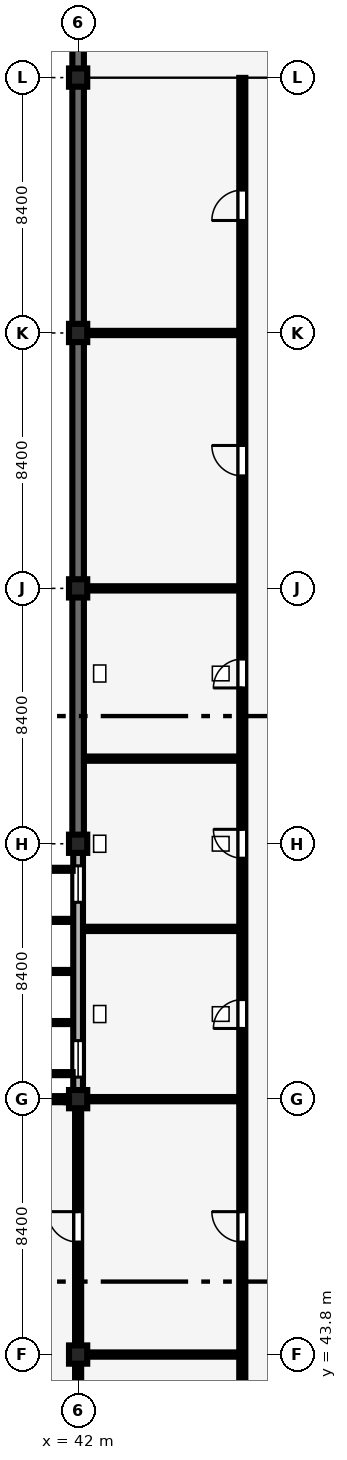
"""IFC4 building model, lengths in metres.
Left out: names, types, materials, properties, quantities, classifications, styles, units other than length and angle.
Written with IfcOpenShell. Run it as: python <this file> out.ifc"""

import sys

from ifc_helpers import new_model, si_unit, direction, frame, frame_2d, origin, origin_2d, place, context, subcontext, project, spatial, rectangle, extrude, element, fill, save


model = new_model("IFC4")
c1 = context("Model", 3, precision=1e-05, world=origin(), true_north=direction((0.0, 1.0)))
c2 = subcontext(c1, "Body", "Model", "MODEL_VIEW")
j1 = project(units=[si_unit("LENGTHUNIT", "METRE"), si_unit("PLANEANGLEUNIT", "RADIAN")], contexts=[c1])
p1 = place(None, origin())
s1 = spatial("IfcSite", under=j1, at=p1, CompositionType="ELEMENT")
p2 = place(p1, origin())
s2 = spatial("IfcBuilding", under=s1, at=p2, CompositionType="ELEMENT")
p3 = place(p2, frame((0.0, 0.0, 4.8)))
s3 = spatial("IfcBuildingStorey", under=s2, at=p3, CompositionType="ELEMENT", Elevation=4.8)
for number, where, z_axis, x_axis in (
    (1, (42.0, 43.8, 0.0), (0.0, 0.0, 1.0), (1.0, 0.0, 0.0)),
    (2, (42.0, 52.2, 0.0), (0.0, 0.0, 1.0), (1.0, 0.0, 0.0)),
    (3, (42.0, 60.6, 0.0), (0.0, 0.0, 1.0), (1.0, 0.0, 0.0)),
    (4, (42.0, 69.0, 0.0), (0.0, 0.0, 1.0), (1.0, 0.0, 0.0)),
    (5, (42.0, 77.4, 0.0), (0.0, 0.0, 1.0), (1.0, 0.0, 0.0)),
    (6, (42.0, 85.8, 0.0), (0.0, 0.0, 1.0), (1.0, 0.0, 0.0)),
):
    element("IfcColumn", number, at=place(p3, frame(where, z_axis=z_axis, x_axis=x_axis)), inside=s3, PredefinedType="COLUMN", context=c2, shape_type="SweptSolid", body=[
        extrude(rectangle(XDim=0.6, YDim=0.6, at=origin_2d()), origin(), (0.0, 0.0, 1.0), 4.2),
    ])
p4 = place(p3, frame((42.0, 86.075, 0.0), z_axis=(0.0, 0.0, 1.0), x_axis=(0.0, 1.0, 0.0)))
e7 = element("IfcWall", 7, at=p4, inside=s3, PredefinedType="SHEAR", context=c2, shape_type="SweptSolid", body=[
    extrude(rectangle(XDim=8.45, YDim=0.38, at=frame_2d((4.225, 0.0))), origin(), (0.0, 0.0, 1.0), 3.372),
])
p5 = place(p3, frame((42.0, 52.475, 0.0), z_axis=(0.0, 0.0, 1.0), x_axis=(0.0, 1.0, 0.0)))
e8 = element("IfcWall", 8, at=p5, inside=s3, PredefinedType="SOLIDWALL", context=c2, shape_type="SweptSolid", body=[
    extrude(rectangle(XDim=7.85, YDim=0.32, at=frame_2d((3.925, 0.0))), origin(), (0.0, 0.0, 1.0), 3.352),
])
p6 = place(p5, frame((0.45, 0.0, 0.85)))
e9 = element("IfcOpeningElement", 9, at=p6, cuts=e8, PredefinedType="OPENING", context=c2, shape_type="SweptSolid", body=[
    extrude(rectangle(XDim=1.2, YDim=1.5, at=frame_2d((0.6, 0.75))), frame((0.0, 0.17, 0.0), z_axis=(0.0, -1.0, 0.0), x_axis=(1.0, 0.0, 0.0)), (0.0, 0.0, 1.0), 0.34),
])
p7 = place(p5, frame((6.2, 0.0, 0.85)))
e10 = element("IfcOpeningElement", 10, at=p7, cuts=e8, PredefinedType="OPENING", context=c2, shape_type="SweptSolid", body=[
    extrude(rectangle(XDim=1.2, YDim=1.5, at=frame_2d((0.6, 0.75))), frame((0.0, 0.17, 0.0), z_axis=(0.0, -1.0, 0.0), x_axis=(1.0, 0.0, 0.0)), (0.0, 0.0, 1.0), 0.34),
])
for number, where, z_axis, x_axis in (
    (11, (42.0, 60.875, 0.0), (0.0, 0.0, 1.0), (0.0, 1.0, 0.0)),
    (12, (42.0, 69.275, 0.0), (0.0, 0.0, 1.0), (0.0, 1.0, 0.0)),
):
    element("IfcWall", number, at=place(p3, frame(where, z_axis=z_axis, x_axis=x_axis)), inside=s3, PredefinedType="SHEAR", context=c2, shape_type="SweptSolid", body=[
        extrude(rectangle(XDim=7.85, YDim=0.38, at=frame_2d((3.925, 0.0))), origin(), (0.0, 0.0, 1.0), 3.352),
    ])
p8 = place(p3, frame((42.0, 77.675, 0.0), z_axis=(0.0, 0.0, 1.0), x_axis=(0.0, 1.0, 0.0)))
e13 = element("IfcWall", 13, at=p8, inside=s3, PredefinedType="SHEAR", context=c2, shape_type="SweptSolid", body=[
    extrude(rectangle(XDim=7.85, YDim=0.38, at=frame_2d((3.925, 0.0))), origin(), (0.0, 0.0, 1.0), 3.352),
])
p9 = place(p3, frame((42.105, 43.8, 0.0), z_axis=(0.0, 0.0, 1.0), x_axis=(1.0, 0.0, 0.0)))
e14 = element("IfcWall", 14, at=p9, inside=s3, PredefinedType="PARTITIONING", context=c2, shape_type="SweptSolid", body=[
    extrude(rectangle(XDim=5.19, YDim=0.14, at=frame_2d((2.595, 0.0))), origin(), (0.0, 0.0, 1.0), 3.01),
])
p10 = place(p3, frame((42.165, 52.2, 0.0), z_axis=(0.0, 0.0, 1.0), x_axis=(1.0, 0.0, 0.0)))
e15 = element("IfcWall", 15, at=p10, inside=s3, PredefinedType="PARTITIONING", context=c2, shape_type="SweptSolid", body=[
    extrude(rectangle(XDim=5.13, YDim=0.14, at=frame_2d((2.565, 0.0))), origin(), (0.0, 0.0, 1.0), 3.21),
])
p11 = place(p3, frame((42.165, 57.8, 0.0), z_axis=(0.0, 0.0, 1.0), x_axis=(1.0, 0.0, 0.0)))
e16 = element("IfcWall", 16, at=p11, inside=s3, PredefinedType="PARTITIONING", context=c2, shape_type="SweptSolid", body=[
    extrude(rectangle(XDim=5.13, YDim=0.14, at=frame_2d((2.565, 0.0))), origin(), (0.0, 0.0, 1.0), 3.51),
])
p12 = place(p3, frame((42.195, 63.4, 0.0), z_axis=(0.0, 0.0, 1.0), x_axis=(1.0, 0.0, 0.0)))
e17 = element("IfcWall", 17, at=p12, inside=s3, PredefinedType="PARTITIONING", context=c2, shape_type="SweptSolid", body=[
    extrude(rectangle(XDim=5.1, YDim=0.14, at=frame_2d((2.55, 0.0))), origin(), (0.0, 0.0, 1.0), 3.51),
])
p13 = place(p3, frame((42.195, 69.0, 0.0), z_axis=(0.0, 0.0, 1.0), x_axis=(1.0, 0.0, 0.0)))
e18 = element("IfcWall", 18, at=p13, inside=s3, PredefinedType="PARTITIONING", context=c2, shape_type="SweptSolid", body=[
    extrude(rectangle(XDim=5.1, YDim=0.14, at=frame_2d((2.55, 0.0))), origin(), (0.0, 0.0, 1.0), 2.91),
])
p14 = place(p3, frame((42.195, 77.4, 0.0), z_axis=(0.0, 0.0, 1.0), x_axis=(1.0, 0.0, 0.0)))
e19 = element("IfcWall", 19, at=p14, inside=s3, PredefinedType="PARTITIONING", context=c2, shape_type="SweptSolid", body=[
    extrude(rectangle(XDim=5.1, YDim=0.14, at=frame_2d((2.55, 0.0))), origin(), (0.0, 0.0, 1.0), 3.26),
])
p15 = place(p3, frame((47.4, 27.165, 0.0), z_axis=(0.0, 0.0, 1.0), x_axis=(0.0, 1.0, 0.0)))
e20 = element("IfcWall", 20, at=p15, inside=s3, PredefinedType="PARTITIONING", context=c2, shape_type="SweptSolid", body=[
    extrude(rectangle(XDim=58.625, YDim=0.2, at=frame_2d((29.312, 0.0))), origin(), (0.0, 0.0, 1.0), 3.9),
])
p16 = place(p15, frame((0.685, 0.0, 0.0)))
e21 = element("IfcOpeningElement", 21, at=p16, cuts=e20, PredefinedType="OPENING", context=c2, shape_type="SweptSolid", body=[
    extrude(rectangle(XDim=1.5, YDim=2.2, at=frame_2d((0.75, 1.1))), frame((0.0, 0.11, 0.0), z_axis=(0.0, -1.0, 0.0), x_axis=(1.0, 0.0, 0.0)), (0.0, 0.0, 1.0), 0.22),
])
p17 = place(p15, frame((4.935, 0.0, 0.0)))
e22 = element("IfcOpeningElement", 22, at=p17, cuts=e20, PredefinedType="OPENING", context=c2, shape_type="SweptSolid", body=[
    extrude(rectangle(XDim=1.0, YDim=2.15, at=frame_2d((0.5, 1.075))), frame((0.0, 0.11, 0.0), z_axis=(0.0, -1.0, 0.0), x_axis=(1.0, 0.0, 0.0)), (0.0, 0.0, 1.0), 0.22),
])
p18 = place(p15, frame((11.935, 0.0, 0.0)))
e23 = element("IfcOpeningElement", 23, at=p18, cuts=e20, PredefinedType="OPENING", context=c2, shape_type="SweptSolid", body=[
    extrude(rectangle(XDim=1.0, YDim=2.15, at=frame_2d((0.5, 1.075))), frame((0.0, 0.11, 0.0), z_axis=(0.0, -1.0, 0.0), x_axis=(1.0, 0.0, 0.0)), (0.0, 0.0, 1.0), 0.22),
])
p19 = place(p15, frame((20.335, 0.0, 0.0)))
e24 = element("IfcOpeningElement", 24, at=p19, cuts=e20, PredefinedType="OPENING", context=c2, shape_type="SweptSolid", body=[
    extrude(rectangle(XDim=1.0, YDim=2.15, at=frame_2d((0.5, 1.075))), frame((0.0, 0.11, 0.0), z_axis=(0.0, -1.0, 0.0), x_axis=(1.0, 0.0, 0.0)), (0.0, 0.0, 1.0), 0.22),
])
p20 = place(p15, frame((27.36, 0.0, 0.0)))
e25 = element("IfcOpeningElement", 25, at=p20, cuts=e20, PredefinedType="OPENING", context=c2, shape_type="SweptSolid", body=[
    extrude(rectangle(XDim=0.95, YDim=2.2, at=frame_2d((0.475, 1.1))), frame((0.0, 0.11, 0.0), z_axis=(0.0, -1.0, 0.0), x_axis=(1.0, 0.0, 0.0)), (0.0, 0.0, 1.0), 0.22),
])
p21 = place(p15, frame((32.96, 0.0, 0.0)))
e26 = element("IfcOpeningElement", 26, at=p21, cuts=e20, PredefinedType="OPENING", context=c2, shape_type="SweptSolid", body=[
    extrude(rectangle(XDim=0.95, YDim=2.2, at=frame_2d((0.475, 1.1))), frame((0.0, 0.11, 0.0), z_axis=(0.0, -1.0, 0.0), x_axis=(1.0, 0.0, 0.0)), (0.0, 0.0, 1.0), 0.22),
])
p22 = place(p15, frame((38.56, 0.0, 0.0)))
e27 = element("IfcOpeningElement", 27, at=p22, cuts=e20, PredefinedType="OPENING", context=c2, shape_type="SweptSolid", body=[
    extrude(rectangle(XDim=0.95, YDim=2.1, at=frame_2d((0.475, 1.05))), frame((0.0, 0.11, 0.0), z_axis=(0.0, -1.0, 0.0), x_axis=(1.0, 0.0, 0.0)), (0.0, 0.0, 1.0), 0.22),
])
p23 = place(p15, frame((45.535, 0.0, 0.0)))
e28 = element("IfcOpeningElement", 28, at=p23, cuts=e20, PredefinedType="OPENING", context=c2, shape_type="SweptSolid", body=[
    extrude(rectangle(XDim=1.0, YDim=2.15, at=frame_2d((0.5, 1.075))), frame((0.0, 0.11, 0.0), z_axis=(0.0, -1.0, 0.0), x_axis=(1.0, 0.0, 0.0)), (0.0, 0.0, 1.0), 0.22),
])
p24 = place(p15, frame((53.935, 0.0, 0.0)))
e29 = element("IfcOpeningElement", 29, at=p24, cuts=e20, PredefinedType="OPENING", context=c2, shape_type="SweptSolid", body=[
    extrude(rectangle(XDim=1.0, YDim=2.15, at=frame_2d((0.5, 1.075))), frame((0.0, 0.11, 0.0), z_axis=(0.0, -1.0, 0.0), x_axis=(1.0, 0.0, 0.0)), (0.0, 0.0, 1.0), 0.22),
])
p25 = place(p3, frame((42.0, 35.71, 0.0), z_axis=(0.0, 0.0, 1.0), x_axis=(0.0, 1.0, 0.0)))
e30 = element("IfcWall", 30, at=p25, inside=s3, PredefinedType="PARTITIONING", context=c2, shape_type="SweptSolid", body=[
    extrude(rectangle(XDim=7.78, YDim=0.2, at=frame_2d((3.89, 0.0))), origin(), (0.0, 0.0, 1.0), 3.352),
])
p26 = place(p25, frame((3.39, 0.0, 0.0)))
e31 = element("IfcOpeningElement", 31, at=p26, cuts=e30, PredefinedType="OPENING", context=c2, shape_type="SweptSolid", body=[
    extrude(rectangle(XDim=1.0, YDim=2.15, at=frame_2d((0.5, 1.075))), frame((0.0, 0.11, 0.0), z_axis=(0.0, -1.0, 0.0), x_axis=(1.0, 0.0, 0.0)), (0.0, 0.0, 1.0), 0.22),
])
p27 = place(p3, frame((42.0, 44.11, 0.0), z_axis=(0.0, 0.0, 1.0), x_axis=(0.0, 1.0, 0.0)))
e32 = element("IfcWall", 32, at=p27, inside=s3, PredefinedType="PARTITIONING", context=c2, shape_type="SweptSolid", body=[
    extrude(rectangle(XDim=7.985, YDim=0.2, at=frame_2d((3.992, 0.0))), origin(), (0.0, 0.0, 1.0), 3.352),
])
p28 = place(p27, frame((3.39, 0.0, 0.0)))
e33 = element("IfcOpeningElement", 33, at=p28, cuts=e32, PredefinedType="OPENING", context=c2, shape_type="SweptSolid", body=[
    extrude(rectangle(XDim=1.0, YDim=2.15, at=frame_2d((0.5, 1.075))), frame((0.0, 0.11, 0.0), z_axis=(0.0, -1.0, 0.0), x_axis=(1.0, 0.0, 0.0)), (0.0, 0.0, 1.0), 0.22),
])
p29 = place(p6, origin())
e34 = element("IfcWindow", 34, at=p29, inside=s3, PartitioningType="SINGLE_PANEL", PredefinedType="WINDOW", context=c2, shape_type="SweptSolid", body=[
    extrude(rectangle(XDim=1.2, YDim=1.5, at=frame_2d((0.6, 0.75))), frame((0.0, 0.03, 0.0), z_axis=(0.0, -1.0, 0.0), x_axis=(1.0, 0.0, 0.0)), (0.0, 0.0, 1.0), 0.06),
])
fill(e9, e34)
p30 = place(p7, origin())
e35 = element("IfcWindow", 35, at=p30, inside=s3, PartitioningType="SINGLE_PANEL", PredefinedType="WINDOW", context=c2, shape_type="SweptSolid", body=[
    extrude(rectangle(XDim=1.2, YDim=1.5, at=frame_2d((0.6, 0.75))), frame((0.0, 0.03, 0.0), z_axis=(0.0, -1.0, 0.0), x_axis=(1.0, 0.0, 0.0)), (0.0, 0.0, 1.0), 0.06),
])
fill(e10, e35)
p31 = place(p19, origin())
e36 = element("IfcDoor", 36, at=p31, inside=s3, OperationType="SINGLE_SWING_RIGHT", PredefinedType="DOOR", context=c2, shape_type="SweptSolid", body=[
    extrude(rectangle(XDim=1.0, YDim=2.15, at=frame_2d((0.5, 1.075))), frame((0.0, 0.025, 0.0), z_axis=(0.0, -1.0, 0.0), x_axis=(1.0, 0.0, 0.0)), (0.0, 0.0, 1.0), 0.05),
])
fill(e24, e36)
p32 = place(p20, origin())
e37 = element("IfcDoor", 37, at=p32, inside=s3, OperationType="SINGLE_SWING_LEFT", PredefinedType="DOOR", context=c2, shape_type="SweptSolid", body=[
    extrude(rectangle(XDim=0.95, YDim=2.2, at=frame_2d((0.475, 1.1))), frame((0.0, 0.025, 0.0), z_axis=(0.0, -1.0, 0.0), x_axis=(1.0, 0.0, 0.0)), (0.0, 0.0, 1.0), 0.05),
])
fill(e25, e37)
p33 = place(p21, origin())
e38 = element("IfcDoor", 38, at=p33, inside=s3, OperationType="SINGLE_SWING_RIGHT", PredefinedType="DOOR", context=c2, shape_type="SweptSolid", body=[
    extrude(rectangle(XDim=0.95, YDim=2.2, at=frame_2d((0.475, 1.1))), frame((0.0, 0.025, 0.0), z_axis=(0.0, -1.0, 0.0), x_axis=(1.0, 0.0, 0.0)), (0.0, 0.0, 1.0), 0.05),
])
fill(e26, e38)
p34 = place(p22, origin())
e39 = element("IfcDoor", 39, at=p34, inside=s3, OperationType="SINGLE_SWING_LEFT", PredefinedType="DOOR", context=c2, shape_type="SweptSolid", body=[
    extrude(rectangle(XDim=0.95, YDim=2.1, at=frame_2d((0.475, 1.05))), frame((0.0, 0.025, 0.0), z_axis=(0.0, -1.0, 0.0), x_axis=(1.0, 0.0, 0.0)), (0.0, 0.0, 1.0), 0.05),
])
fill(e27, e39)
p35 = place(p23, origin())
e40 = element("IfcDoor", 40, at=p35, inside=s3, OperationType="SINGLE_SWING_RIGHT", PredefinedType="DOOR", context=c2, shape_type="SweptSolid", body=[
    extrude(rectangle(XDim=1.0, YDim=2.15, at=frame_2d((0.5, 1.075))), frame((0.0, 0.025, 0.0), z_axis=(0.0, -1.0, 0.0), x_axis=(1.0, 0.0, 0.0)), (0.0, 0.0, 1.0), 0.05),
])
fill(e28, e40)
p36 = place(p24, origin())
e41 = element("IfcDoor", 41, at=p36, inside=s3, OperationType="SINGLE_SWING_LEFT", PredefinedType="DOOR", context=c2, shape_type="SweptSolid", body=[
    extrude(rectangle(XDim=1.0, YDim=2.15, at=frame_2d((0.5, 1.075))), frame((0.0, 0.025, 0.0), z_axis=(0.0, -1.0, 0.0), x_axis=(1.0, 0.0, 0.0)), (0.0, 0.0, 1.0), 0.05),
])
fill(e29, e41)
p37 = place(p28, origin())
e42 = element("IfcDoor", 42, at=p37, inside=s3, OperationType="SINGLE_SWING_RIGHT", PredefinedType="DOOR", context=c2, shape_type="SweptSolid", body=[
    extrude(rectangle(XDim=1.0, YDim=2.15, at=frame_2d((0.5, 1.075))), frame((0.0, 0.025, 0.0), z_axis=(0.0, -1.0, 0.0), x_axis=(1.0, 0.0, 0.0)), (0.0, 0.0, 1.0), 0.05),
])
fill(e33, e42)
save(model, sys.argv[1])
